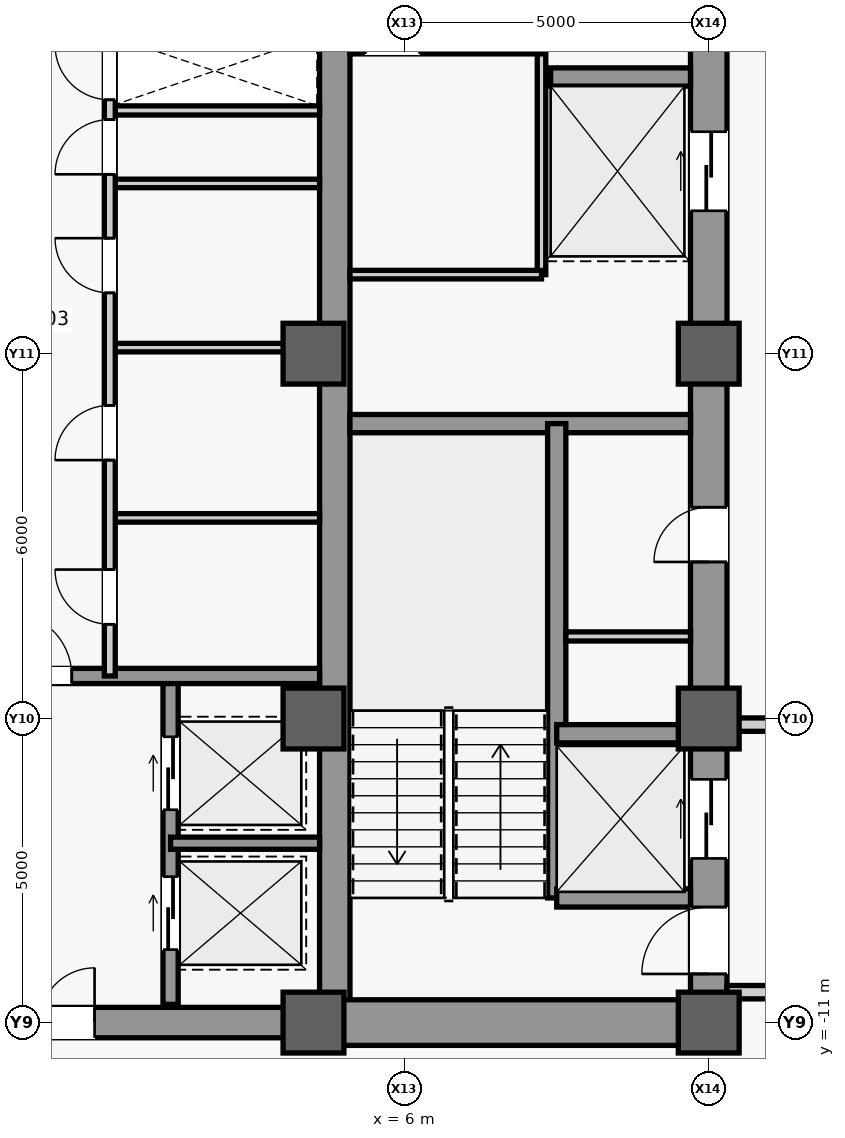
"""IFC4 building model, lengths in metres.
Left out: names, types, materials, properties, quantities, classifications, styles, units other than length and angle.
Written with IfcOpenShell. Run it as: python <this file> out.ifc"""

import sys

from ifc_helpers import new_model, si_unit, direction, frame, frame_2d, origin, origin_2d, place, context, subcontext, project, spatial, rectangle, extrude, source, transform, mapped, element, fill, save


model = new_model("IFC4")
c1 = context("Model", 3, precision=1e-05, world=origin(), true_north=direction((0.0, 1.0)))
c2 = subcontext(c1, "Body", "Model", "MODEL_VIEW")
j1 = project(units=[si_unit("LENGTHUNIT", "METRE"), si_unit("PLANEANGLEUNIT", "RADIAN")], contexts=[c1])
p1 = place(None, origin())
s1 = spatial("IfcSite", under=j1, at=p1, CompositionType="ELEMENT")
p2 = place(p1, origin())
s2 = spatial("IfcBuilding", under=s1, at=p2, CompositionType="ELEMENT")
p3 = place(p2, frame((0.0, 0.0, 116.0)))
s3 = spatial("IfcBuildingStorey", under=s2, at=p3, CompositionType="ELEMENT", Elevation=116.0)
m1 = source(origin(), c2, "Body", "SweptSolid", [
    extrude(rectangle(XDim=22.0, YDim=0.6, at=frame_2d((11.0, 0.0))), origin(), (0.0, 0.0, 1.0), 3.84),
])
p4 = place(p3, frame((11.0, -11.0, 0.0), z_axis=(0.0, 0.0, 1.0), x_axis=(0.0, 1.0, 0.0)))
e1 = element("IfcWall", 1, at=p4, inside=s3, PredefinedType="SHEAR", context=c2, shape_type="MappedRepresentation", body=[
    mapped(m1, transform((0.0, 0.0, 0.0), scale=1.0)),
])
m2 = source(origin(), c2, "Body", "SweptSolid", [
    extrude(rectangle(XDim=1.1, YDim=2.2, at=frame_2d((0.55, 1.1))), frame((0.0, 0.31, 0.0), z_axis=(0.0, -1.0, 0.0), x_axis=(1.0, 0.0, 0.0)), (0.0, 0.0, 1.0), 0.62),
])
p5 = place(p4, frame((0.8, 0.0, 0.0)))
e2 = element("IfcOpeningElement", 2, at=p5, cuts=e1, PredefinedType="OPENING", context=c2, shape_type="MappedRepresentation", body=[
    mapped(m2, transform((0.0, 0.0, 0.0), scale=1.0)),
])
m3 = source(origin(), c2, "Body", "SweptSolid", [
    extrude(rectangle(XDim=0.9, YDim=2.15, at=frame_2d((0.45, 1.075))), frame((0.0, 0.31, 0.0), z_axis=(0.0, -1.0, 0.0), x_axis=(1.0, 0.0, 0.0)), (0.0, 0.0, 1.0), 0.62),
])
p6 = place(p4, frame((7.575, 0.0, 0.0)))
e3 = element("IfcOpeningElement", 3, at=p6, cuts=e1, PredefinedType="OPENING", context=c2, shape_type="MappedRepresentation", body=[
    mapped(m3, transform((0.0, 0.0, 0.0), scale=1.0)),
])
m4 = source(origin(), c2, "Body", "SweptSolid", [
    extrude(rectangle(XDim=1.3, YDim=2.3, at=frame_2d((0.65, 1.15))), frame((0.0, 0.31, 0.0), z_axis=(0.0, -1.0, 0.0), x_axis=(1.0, 0.0, 0.0)), (0.0, 0.0, 1.0), 0.62),
])
p7 = place(p4, frame((2.7, 0.0, 0.0)))
e4 = element("IfcOpeningElement", 4, at=p7, cuts=e1, PredefinedType="OPENING", context=c2, shape_type="MappedRepresentation", body=[
    mapped(m4, transform((0.0, 0.0, 0.0), scale=1.0)),
])
p8 = place(p4, frame((13.35, 0.0, 0.0)))
e5 = element("IfcOpeningElement", 5, at=p8, cuts=e1, PredefinedType="OPENING", context=c2, shape_type="MappedRepresentation", body=[
    mapped(m4, transform((0.0, 0.0, 0.0), scale=1.0)),
])
m5 = source(origin(), c2, "Body", "SweptSolid", [
    extrude(rectangle(XDim=21.4, YDim=0.5, at=frame_2d((10.7, 0.0))), origin(), (0.0, 0.0, 1.0), 3.84),
])
p9 = place(p3, frame((4.85, -10.7, 0.0), z_axis=(0.0, 0.0, 1.0), x_axis=(0.0, 1.0, 0.0)))
e6 = element("IfcWall", 6, at=p9, inside=s3, PredefinedType="SHEAR", context=c2, shape_type="MappedRepresentation", body=[
    mapped(m5, transform((0.0, 0.0, 0.0), scale=1.0)),
])
m6 = source(origin(), c2, "Body", "SweptSolid", [
    extrude(rectangle(XDim=5.85, YDim=0.75, at=frame_2d((2.925, 0.0))), origin(), (0.0, 0.0, 1.0), 3.84),
])
p10 = place(p3, frame((4.85, -11.0, 0.0), z_axis=(0.0, 0.0, 1.0), x_axis=(1.0, 0.0, 0.0)))
e7 = element("IfcWall", 7, at=p10, inside=s3, PredefinedType="SHEAR", context=c2, shape_type="MappedRepresentation", body=[
    mapped(m6, transform((0.0, 0.0, 0.0), scale=1.0)),
])
m7 = source(origin(), c2, "Body", "SweptSolid", [
    extrude(rectangle(XDim=5.6, YDim=0.3, at=frame_2d((2.8, 0.0))), origin(), (0.0, 0.0, 1.0), 3.84),
])
p11 = place(p3, frame((5.1, -1.15, 0.0), z_axis=(0.0, 0.0, 1.0), x_axis=(1.0, 0.0, 0.0)))
e8 = element("IfcWall", 8, at=p11, inside=s3, PredefinedType="SHEAR", context=c2, shape_type="MappedRepresentation", body=[
    mapped(m7, transform((0.0, 0.0, 0.0), scale=1.0)),
])
m8 = source(origin(), c2, "Body", "SweptSolid", [
    extrude(rectangle(XDim=9.2, YDim=0.5, at=frame_2d((4.6, 0.0))), origin(), (0.0, 0.0, 1.0), 3.84),
])
p12 = place(p3, frame((-4.6, -11.0, 0.0), z_axis=(0.0, 0.0, 1.0), x_axis=(1.0, 0.0, 0.0)))
e9 = element("IfcWall", 9, at=p12, inside=s3, PredefinedType="SHEAR", context=c2, shape_type="MappedRepresentation", body=[
    mapped(m8, transform((0.0, 0.0, 0.0), scale=1.0)),
])
m9 = source(origin(), c2, "Body", "SweptSolid", [
    extrude(rectangle(XDim=1.8, YDim=2.25, at=frame_2d((0.9, 1.125))), frame((0.0, 0.26, 0.0), z_axis=(0.0, -1.0, 0.0), x_axis=(1.0, 0.0, 0.0)), (0.0, 0.0, 1.0), 0.52),
])
p13 = place(p12, frame((3.7, 0.0, 0.0)))
e10 = element("IfcOpeningElement", 10, at=p13, cuts=e9, PredefinedType="OPENING", context=c2, shape_type="MappedRepresentation", body=[
    mapped(m9, transform((0.0, 0.0, 0.0), scale=1.0)),
])
m10 = source(origin(), c2, "Body", "SweptSolid", [
    extrude(rectangle(XDim=1.0, YDim=1.0, at=origin_2d()), origin(), (0.0, 0.0, 1.0), 4.1),
])
for number, where, z_axis, x_axis in (
    (11, (4.5, -11.0, 0.0), (0.0, 0.0, 1.0), (1.0, 0.0, 0.0)),
    (12, (4.5, -6.0, 0.0), (0.0, 0.0, 1.0), (1.0, 0.0, 0.0)),
    (13, (4.5, 0.0, 0.0), (0.0, 0.0, 1.0), (1.0, 0.0, 0.0)),
    (14, (11.0, -11.0, 0.0), (0.0, 0.0, 1.0), (1.0, 0.0, 0.0)),
    (15, (11.0, -6.0, 0.0), (0.0, 0.0, 1.0), (1.0, 0.0, 0.0)),
    (16, (11.0, 0.0, 0.0), (0.0, 0.0, 1.0), (1.0, 0.0, 0.0)),
):
    element("IfcColumn", number, at=place(p3, frame(where, z_axis=z_axis, x_axis=x_axis)), inside=s3, PredefinedType="COLUMN", context=c2, shape_type="MappedRepresentation", body=[
        mapped(m10, transform((0.0, 0.0, 0.0), scale=1.0)),
    ])
m11 = source(origin(), c2, "Body", "SweptSolid", [
    extrude(rectangle(XDim=7.8, YDim=0.3, at=frame_2d((3.9, 0.0))), origin(), (0.0, 0.0, 1.0), 3.84),
])
p14 = place(p3, frame((8.5, -8.95, 0.0), z_axis=(0.0, 0.0, 1.0), x_axis=(0.0, 1.0, 0.0)))
e17 = element("IfcWall", 17, at=p14, inside=s3, PredefinedType="SHEAR", context=c2, shape_type="MappedRepresentation", body=[
    mapped(m11, transform((0.0, 0.0, 0.0), scale=1.0)),
])
m12 = source(origin(), c2, "Body", "SweptSolid", [
    extrude(rectangle(XDim=2.2, YDim=0.3, at=frame_2d((1.1, 0.0))), origin(), (0.0, 0.0, 1.0), 3.84),
])
for number, where, z_axis, x_axis in (
    (18, (8.5, -8.95, 0.0), (0.0, 0.0, 1.0), (1.0, 0.0, 0.0)),
    (19, (8.5, -6.25, 0.0), (0.0, 0.0, 1.0), (1.0, 0.0, 0.0)),
):
    element("IfcWall", number, at=place(p3, frame(where, z_axis=z_axis, x_axis=x_axis)), inside=s3, PredefinedType="SHEAR", context=c2, shape_type="MappedRepresentation", body=[
        mapped(m12, transform((0.0, 0.0, 0.0), scale=1.0)),
    ])
m13 = source(origin(), c2, "Body", "SweptSolid", [
    extrude(rectangle(XDim=2.3, YDim=0.3, at=frame_2d((1.15, 0.0))), origin(), (0.0, 0.0, 1.0), 3.84),
])
p15 = place(p3, frame((8.4, 4.55, 0.0), z_axis=(0.0, 0.0, 1.0), x_axis=(1.0, 0.0, 0.0)))
e20 = element("IfcWall", 20, at=p15, inside=s3, PredefinedType="SHEAR", context=c2, shape_type="MappedRepresentation", body=[
    mapped(m13, transform((0.0, 0.0, 0.0), scale=1.0)),
])
m14 = source(origin(), c2, "Body", "SweptSolid", [
    extrude(rectangle(XDim=2.05, YDim=0.15, at=frame_2d((1.025, 0.0))), origin(), (0.0, 0.0, 1.0), 3.84),
])
p16 = place(p3, frame((8.65, -4.65, 0.0), z_axis=(0.0, 0.0, 1.0), x_axis=(1.0, 0.0, 0.0)))
e21 = element("IfcWall", 21, at=p16, inside=s3, PredefinedType="PARTITIONING", context=c2, shape_type="MappedRepresentation", body=[
    mapped(m14, transform((0.0, 0.0, 0.0), scale=1.0)),
])
m15 = source(origin(), c2, "Body", "SweptSolid", [
    extrude(rectangle(XDim=9.4, YDim=0.14, at=frame_2d((4.7, 0.0))), origin(), (0.0, 0.0, 1.0), 3.84),
])
p17 = place(p3, frame((8.25, 1.3, 0.0), z_axis=(0.0, 0.0, 1.0), x_axis=(0.0, 1.0, 0.0)))
e22 = element("IfcWall", 22, at=p17, inside=s3, PredefinedType="PARTITIONING", context=c2, shape_type="MappedRepresentation", body=[
    mapped(m15, transform((0.0, 0.0, 0.0), scale=1.0)),
])
m16 = source(origin(), c2, "Body", "SweptSolid", [
    extrude(rectangle(XDim=3.15, YDim=0.14, at=frame_2d((1.575, 0.0))), origin(), (0.0, 0.0, 1.0), 3.84),
])
p18 = place(p3, frame((5.1, 1.3, 0.0), z_axis=(0.0, 0.0, 1.0), x_axis=(1.0, 0.0, 0.0)))
e23 = element("IfcWall", 23, at=p18, inside=s3, PredefinedType="PARTITIONING", context=c2, shape_type="MappedRepresentation", body=[
    mapped(m16, transform((0.0, 0.0, 0.0), scale=1.0)),
])
p19 = place(p3, frame((5.1, 5.0, 0.0), z_axis=(0.0, 0.0, 1.0), x_axis=(1.0, 0.0, 0.0)))
e24 = element("IfcWall", 24, at=p19, inside=s3, PredefinedType="PARTITIONING", context=c2, shape_type="MappedRepresentation", body=[
    mapped(m16, transform((0.0, 0.0, 0.0), scale=1.0)),
])
m17 = source(origin(), c2, "Body", "SweptSolid", [
    extrude(rectangle(XDim=0.9, YDim=2.15, at=frame_2d((0.45, 1.075))), frame((0.0, 0.08, 0.0), z_axis=(0.0, -1.0, 0.0), x_axis=(1.0, 0.0, 0.0)), (0.0, 0.0, 1.0), 0.16),
])
p20 = place(p19, frame((0.25, 0.0, 0.0)))
e25 = element("IfcOpeningElement", 25, at=p20, cuts=e24, PredefinedType="OPENING", context=c2, shape_type="MappedRepresentation", body=[
    mapped(m17, transform((0.0, 0.0, 0.0), scale=1.0)),
])
m18 = source(origin(), c2, "Body", "SweptSolid", [
    extrude(rectangle(XDim=4.05, YDim=0.22, at=frame_2d((2.025, 0.0))), origin(), (0.0, 0.0, 1.0), 3.84),
])
p21 = place(p3, frame((11.3, -10.5, 0.0), z_axis=(0.0, 0.0, 1.0), x_axis=(1.0, 0.0, 0.0)))
e26 = element("IfcWall", 26, at=p21, inside=s3, PredefinedType="PARTITIONING", context=c2, shape_type="MappedRepresentation", body=[
    mapped(m18, transform((0.0, 0.0, 0.0), scale=1.0)),
])
m19 = source(origin(), c2, "Body", "SweptSolid", [
    extrude(rectangle(XDim=4.05, YDim=0.22, at=frame_2d((2.025, 0.0))), origin(), (0.0, 0.0, 1.0), 3.067),
])
p22 = place(p3, frame((11.3, -6.1, 0.0), z_axis=(0.0, 0.0, 1.0), x_axis=(1.0, 0.0, 0.0)))
e27 = element("IfcWall", 27, at=p22, inside=s3, PredefinedType="PARTITIONING", context=c2, shape_type="MappedRepresentation", body=[
    mapped(m19, transform((0.0, 0.0, 0.0), scale=1.0)),
])
m20 = source(origin(), c2, "Body", "SweptSolid", [
    extrude(rectangle(XDim=3.45, YDim=0.15, at=frame_2d((1.725, 0.0))), origin(), (0.0, 0.0, 1.0), 3.84),
])
p23 = place(p3, frame((1.15, 4.0, 0.0), z_axis=(0.0, 0.0, 1.0), x_axis=(1.0, 0.0, 0.0)))
e28 = element("IfcWall", 28, at=p23, inside=s3, PredefinedType="PARTITIONING", context=c2, shape_type="MappedRepresentation", body=[
    mapped(m20, transform((0.0, 0.0, 0.0), scale=1.0)),
])
m21 = source(origin(), c2, "Body", "SweptSolid", [
    extrude(rectangle(XDim=5.4, YDim=0.25, at=frame_2d((2.7, 0.0))), origin(), (0.0, 0.0, 1.0), 3.84),
])
p24 = place(p3, frame((2.15, -10.7, 0.0), z_axis=(0.0, 0.0, 1.0), x_axis=(0.0, 1.0, 0.0)))
e29 = element("IfcWall", 29, at=p24, inside=s3, PredefinedType="SHEAR", context=c2, shape_type="MappedRepresentation", body=[
    mapped(m21, transform((0.0, 0.0, 0.0), scale=1.0)),
])
m22 = source(origin(), c2, "Body", "SweptSolid", [
    extrude(rectangle(XDim=1.2, YDim=2.3, at=frame_2d((0.6, 1.15))), frame((0.0, 0.135, 0.0), z_axis=(0.0, -1.0, 0.0), x_axis=(1.0, 0.0, 0.0)), (0.0, 0.0, 1.0), 0.27),
])
p25 = place(p24, frame((0.9, 0.0, 0.0)))
e30 = element("IfcOpeningElement", 30, at=p25, cuts=e29, PredefinedType="OPENING", context=c2, shape_type="MappedRepresentation", body=[
    mapped(m22, transform((0.0, 0.0, 0.0), scale=1.0)),
])
p26 = place(p24, frame((3.2, 0.0, 0.0)))
e31 = element("IfcOpeningElement", 31, at=p26, cuts=e29, PredefinedType="OPENING", context=c2, shape_type="MappedRepresentation", body=[
    mapped(m22, transform((0.0, 0.0, 0.0), scale=1.0)),
])
m23 = source(origin(), c2, "Body", "SweptSolid", [
    extrude(rectangle(XDim=2.45, YDim=0.2, at=frame_2d((1.225, 0.0))), origin(), (0.0, 0.0, 1.0), 3.84),
])
p27 = place(p3, frame((2.15, -8.05, 0.0), z_axis=(0.0, 0.0, 1.0), x_axis=(1.0, 0.0, 0.0)))
e32 = element("IfcWall", 32, at=p27, inside=s3, PredefinedType="SHEAR", context=c2, shape_type="MappedRepresentation", body=[
    mapped(m23, transform((0.0, 0.0, 0.0), scale=1.0)),
])
m24 = source(origin(), c2, "Body", "SweptSolid", [
    extrude(rectangle(XDim=9.2, YDim=0.25, at=frame_2d((4.6, 0.0))), origin(), (0.0, 0.0, 1.0), 3.84),
])
p28 = place(p3, frame((-4.6, -5.3, 0.0), z_axis=(0.0, 0.0, 1.0), x_axis=(1.0, 0.0, 0.0)))
e33 = element("IfcWall", 33, at=p28, inside=s3, PredefinedType="SHEAR", context=c2, shape_type="MappedRepresentation", body=[
    mapped(m24, transform((0.0, 0.0, 0.0), scale=1.0)),
])
m25 = source(origin(), c2, "Body", "SweptSolid", [
    extrude(rectangle(XDim=1.05, YDim=2.2, at=frame_2d((0.525, 1.1))), frame((0.0, 0.135, 0.0), z_axis=(0.0, -1.0, 0.0), x_axis=(1.0, 0.0, 0.0)), (0.0, 0.0, 1.0), 0.27),
])
p29 = place(p28, frame((4.075, 0.0, 0.0)))
e34 = element("IfcOpeningElement", 34, at=p29, cuts=e33, PredefinedType="OPENING", context=c2, shape_type="MappedRepresentation", body=[
    mapped(m25, transform((0.0, 0.0, 0.0), scale=1.0)),
])
m26 = source(origin(), c2, "Body", "SweptSolid", [
    extrude(rectangle(XDim=3.45, YDim=0.14, at=frame_2d((1.725, 0.0))), origin(), (0.0, 0.0, 1.0), 3.84),
])
p30 = place(p3, frame((1.15, -2.7, 0.0), z_axis=(0.0, 0.0, 1.0), x_axis=(1.0, 0.0, 0.0)))
e35 = element("IfcWall", 35, at=p30, inside=s3, PredefinedType="PARTITIONING", context=c2, shape_type="MappedRepresentation", body=[
    mapped(m26, transform((0.0, 0.0, 0.0), scale=1.0)),
])
m27 = source(origin(), c2, "Body", "SweptSolid", [
    extrude(rectangle(XDim=3.45, YDim=0.14, at=frame_2d((1.725, 0.0))), origin(), (0.0, 0.0, 1.0), 3.145),
])
p31 = place(p3, frame((1.15, 0.1, 0.0), z_axis=(0.0, 0.0, 1.0), x_axis=(1.0, 0.0, 0.0)))
e36 = element("IfcWall", 36, at=p31, inside=s3, PredefinedType="PARTITIONING", context=c2, shape_type="MappedRepresentation", body=[
    mapped(m27, transform((0.0, 0.0, 0.0), scale=1.0)),
])
p32 = place(p3, frame((1.15, 2.8, 0.0), z_axis=(0.0, 0.0, 1.0), x_axis=(1.0, 0.0, 0.0)))
e37 = element("IfcWall", 37, at=p32, inside=s3, PredefinedType="PARTITIONING", context=c2, shape_type="MappedRepresentation", body=[
    mapped(m26, transform((0.0, 0.0, 0.0), scale=1.0)),
])
m28 = source(origin(), c2, "Body", "SweptSolid", [
    extrude(rectangle(XDim=10.6, YDim=0.18, at=frame_2d((5.3, 0.0))), origin(), (0.0, 0.0, 1.0), 3.84),
])
p33 = place(p3, frame((1.15, -5.3, 0.0), z_axis=(0.0, 0.0, 1.0), x_axis=(0.0, 1.0, 0.0)))
e38 = element("IfcWall", 38, at=p33, inside=s3, PredefinedType="PARTITIONING", context=c2, shape_type="MappedRepresentation", body=[
    mapped(m28, transform((0.0, 0.0, 0.0), scale=1.0)),
])
m29 = source(origin(), c2, "Body", "SweptSolid", [
    extrude(rectangle(XDim=0.9, YDim=2.15, at=frame_2d((0.45, 1.075))), frame((0.0, 0.1, 0.0), z_axis=(0.0, -1.0, 0.0), x_axis=(1.0, 0.0, 0.0)), (0.0, 0.0, 1.0), 0.2),
])
p34 = place(p33, frame((0.85, 0.0, 0.0)))
e39 = element("IfcOpeningElement", 39, at=p34, cuts=e38, PredefinedType="OPENING", context=c2, shape_type="MappedRepresentation", body=[
    mapped(m29, transform((0.0, 0.0, 0.0), scale=1.0)),
])
p35 = place(p33, frame((3.55, 0.0, 0.0)))
e40 = element("IfcOpeningElement", 40, at=p35, cuts=e38, PredefinedType="OPENING", context=c2, shape_type="MappedRepresentation", body=[
    mapped(m29, transform((0.0, 0.0, 0.0), scale=1.0)),
])
p36 = place(p33, frame((6.3, 0.0, 0.0)))
e41 = element("IfcOpeningElement", 41, at=p36, cuts=e38, PredefinedType="OPENING", context=c2, shape_type="MappedRepresentation", body=[
    mapped(m29, transform((0.0, 0.0, 0.0), scale=1.0)),
])
p37 = place(p33, frame((8.25, 0.0, 0.0)))
e42 = element("IfcOpeningElement", 42, at=p37, cuts=e38, PredefinedType="OPENING", context=c2, shape_type="MappedRepresentation", body=[
    mapped(m29, transform((0.0, 0.0, 0.0), scale=1.0)),
])
p38 = place(p33, frame((9.475, 0.0, 0.0)))
e43 = element("IfcOpeningElement", 43, at=p38, cuts=e38, PredefinedType="OPENING", context=c2, shape_type="MappedRepresentation", body=[
    mapped(m29, transform((0.0, 0.0, 0.0), scale=1.0)),
])
m30 = source(origin(), c2, "Body", "SweptSolid", [
    extrude(rectangle(XDim=1.1, YDim=2.2, at=frame_2d((0.55, 1.1))), frame((0.0, 0.025, 0.0), z_axis=(0.0, -1.0, 0.0), x_axis=(1.0, 0.0, 0.0)), (0.0, 0.0, 1.0), 0.05),
])
p39 = place(p5, origin())
e44 = element("IfcDoor", 44, at=p39, inside=s3, OperationType="SINGLE_SWING_LEFT", PredefinedType="DOOR", context=c2, shape_type="MappedRepresentation", body=[
    mapped(m30, transform((0.0, 0.0, 0.0), scale=1.0)),
])
fill(e2, e44)
m31 = source(origin(), c2, "Body", "SweptSolid", [
    extrude(rectangle(XDim=0.9, YDim=2.15, at=frame_2d((0.45, 1.075))), frame((0.0, 0.025, 0.0), z_axis=(0.0, -1.0, 0.0), x_axis=(1.0, 0.0, 0.0)), (0.0, 0.0, 1.0), 0.05),
])
p40 = place(p6, origin())
e45 = element("IfcDoor", 45, at=p40, inside=s3, OperationType="SINGLE_SWING_LEFT", PredefinedType="DOOR", context=c2, shape_type="MappedRepresentation", body=[
    mapped(m31, transform((0.0, 0.0, 0.0), scale=1.0)),
])
fill(e3, e45)
m32 = source(origin(), c2, "Body", "SweptSolid", [
    extrude(rectangle(XDim=1.05, YDim=2.2, at=frame_2d((0.525, 1.1))), frame((0.0, 0.025, 0.0), z_axis=(0.0, -1.0, 0.0), x_axis=(1.0, 0.0, 0.0)), (0.0, 0.0, 1.0), 0.05),
])
p41 = place(p29, origin())
e46 = element("IfcDoor", 46, at=p41, inside=s3, OperationType="SINGLE_SWING_LEFT", PredefinedType="DOOR", context=c2, shape_type="MappedRepresentation", body=[
    mapped(m32, transform((0.0, 0.0, 0.0), scale=1.0)),
])
fill(e34, e46)
m33 = source(origin(), c2, "Body", "SweptSolid", [
    extrude(rectangle(XDim=1.8, YDim=2.25, at=frame_2d((0.9, 1.125))), frame((0.0, 0.025, 0.0), z_axis=(0.0, -1.0, 0.0), x_axis=(1.0, 0.0, 0.0)), (0.0, 0.0, 1.0), 0.05),
])
p42 = place(p13, origin())
e47 = element("IfcDoor", 47, at=p42, inside=s3, OperationType="SINGLE_SWING_LEFT", PredefinedType="DOOR", context=c2, shape_type="MappedRepresentation", body=[
    mapped(m33, transform((0.0, 0.0, 0.0), scale=1.0)),
])
fill(e10, e47)
p43 = place(p34, origin())
e48 = element("IfcDoor", 48, at=p43, inside=s3, OperationType="SINGLE_SWING_RIGHT", PredefinedType="DOOR", context=c2, shape_type="MappedRepresentation", body=[
    mapped(m31, transform((0.0, 0.0, 0.0), scale=1.0)),
])
fill(e39, e48)
p44 = place(p35, origin())
e49 = element("IfcDoor", 49, at=p44, inside=s3, OperationType="SINGLE_SWING_LEFT", PredefinedType="DOOR", context=c2, shape_type="MappedRepresentation", body=[
    mapped(m31, transform((0.0, 0.0, 0.0), scale=1.0)),
])
fill(e40, e49)
p45 = place(p36, origin())
e50 = element("IfcDoor", 50, at=p45, inside=s3, OperationType="SINGLE_SWING_RIGHT", PredefinedType="DOOR", context=c2, shape_type="MappedRepresentation", body=[
    mapped(m31, transform((0.0, 0.0, 0.0), scale=1.0)),
])
fill(e41, e50)
p46 = place(p37, origin())
e51 = element("IfcDoor", 51, at=p46, inside=s3, OperationType="SINGLE_SWING_LEFT", PredefinedType="DOOR", context=c2, shape_type="MappedRepresentation", body=[
    mapped(m31, transform((0.0, 0.0, 0.0), scale=1.0)),
])
fill(e42, e51)
p47 = place(p38, origin())
e52 = element("IfcDoor", 52, at=p47, inside=s3, OperationType="SINGLE_SWING_RIGHT", PredefinedType="DOOR", context=c2, shape_type="MappedRepresentation", body=[
    mapped(m31, transform((0.0, 0.0, 0.0), scale=1.0)),
])
fill(e43, e52)
m34 = source(origin(), c2, "Body", "SweptSolid", [
    extrude(rectangle(XDim=1.2, YDim=2.3, at=frame_2d((0.6, 1.15))), frame((0.0, 0.025, 0.0), z_axis=(0.0, -1.0, 0.0), x_axis=(1.0, 0.0, 0.0)), (0.0, 0.0, 1.0), 0.05),
])
p48 = place(p25, origin())
e53 = element("IfcDoor", 53, at=p48, inside=s3, OperationType="SLIDING_TO_LEFT", PredefinedType="DOOR", context=c2, shape_type="MappedRepresentation", body=[
    mapped(m34, transform((0.0, 0.0, 0.0), scale=1.0)),
])
fill(e30, e53)
p49 = place(p26, origin())
e54 = element("IfcDoor", 54, at=p49, inside=s3, OperationType="SLIDING_TO_LEFT", PredefinedType="DOOR", context=c2, shape_type="MappedRepresentation", body=[
    mapped(m34, transform((0.0, 0.0, 0.0), scale=1.0)),
])
fill(e31, e54)
m35 = source(origin(), c2, "Body", "SweptSolid", [
    extrude(rectangle(XDim=1.3, YDim=2.3, at=frame_2d((0.65, 1.15))), frame((0.0, 0.025, 0.0), z_axis=(0.0, -1.0, 0.0), x_axis=(1.0, 0.0, 0.0)), (0.0, 0.0, 1.0), 0.05),
])
p50 = place(p7, origin())
e55 = element("IfcDoor", 55, at=p50, inside=s3, OperationType="SLIDING_TO_LEFT", PredefinedType="DOOR", context=c2, shape_type="MappedRepresentation", body=[
    mapped(m35, transform((0.0, 0.0, 0.0), scale=1.0)),
])
fill(e4, e55)
p51 = place(p8, origin())
e56 = element("IfcDoor", 56, at=p51, inside=s3, OperationType="SLIDING_TO_LEFT", PredefinedType="DOOR", context=c2, shape_type="MappedRepresentation", body=[
    mapped(m35, transform((0.0, 0.0, 0.0), scale=1.0)),
])
fill(e5, e56)
save(model, sys.argv[1])
